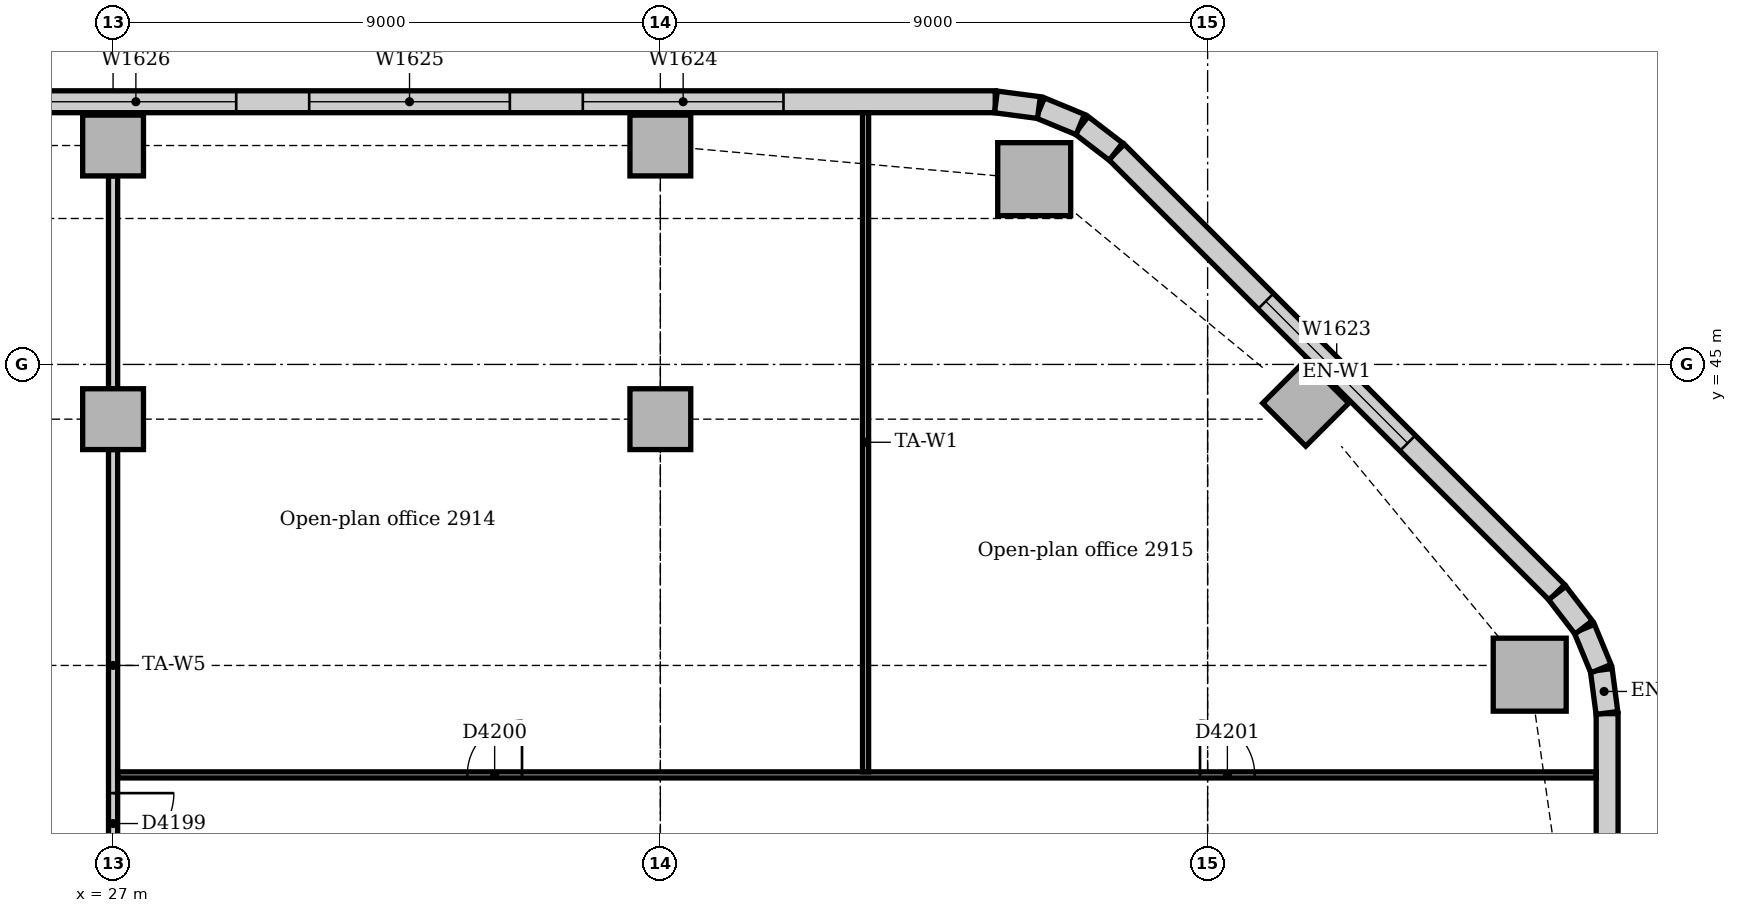
"""IFC4 building model, lengths in metres.
Left out: names, types, materials, properties, quantities, classifications, styles, units other than length and angle.
Written with IfcOpenShell. Run it as: python <this file> out.ifc"""

import sys

from ifc_helpers import new_model, si_unit, direction, frame, frame_2d, origin, origin_2d, place, context, subcontext, project, spatial, rectangle, extrude, element, fill, save


model = new_model("IFC4")
c1 = context("Model", 3, precision=1e-05, world=origin(), true_north=direction((0.0, 1.0)))
c2 = subcontext(c1, "Body", "Model", "MODEL_VIEW")
j1 = project(units=[si_unit("LENGTHUNIT", "METRE"), si_unit("PLANEANGLEUNIT", "RADIAN")], contexts=[c1])
p1 = place(None, origin())
s1 = spatial("IfcSite", under=j1, at=p1, CompositionType="ELEMENT")
p2 = place(p1, origin())
s2 = spatial("IfcBuilding", under=s1, at=p2, CompositionType="ELEMENT")
p3 = place(p2, frame((0.0, 0.0, 124.0)))
s3 = spatial("IfcBuildingStorey", under=s2, at=p3, CompositionType="ELEMENT", Elevation=124.0)
for number, where, z_axis, x_axis in (
    (1, (50.297, 39.898, 0.0), (0.0, 0.0, 1.0), (1.0, 0.0, 0.0)),
    (2, (42.148, 48.047, 0.0), (0.0, 0.0, 1.0), (1.0, 0.0, 0.0)),
):
    element("IfcColumn", number, at=place(p3, frame(where, z_axis=z_axis, x_axis=x_axis)), inside=s3, PredefinedType="COLUMN", context=c2, shape_type="SweptSolid", body=[
        extrude(rectangle(XDim=1.2, YDim=1.2, at=origin_2d()), origin(), (0.0, 0.0, 1.0), 3.85),
    ])
for number, where, z_axis, x_axis in (
    (3, (46.614, 44.364, 0.0), (0.0, 0.0, 1.0), (0.707, 0.707, 0.0)),
    (4, (27.0, 48.6, 0.0), (0.0, 0.0, 1.0), (1.0, 0.0, 0.0)),
    (5, (36.0, 48.6, 0.0), (0.0, 0.0, 1.0), (1.0, 0.0, 0.0)),
    (6, (27.0, 44.1, 0.0), (0.0, 0.0, 1.0), (1.0, 0.0, 0.0)),
    (7, (36.0, 44.1, 0.0), (0.0, 0.0, 1.0), (1.0, 0.0, 0.0)),
):
    element("IfcColumn", number, at=place(p3, frame(where, z_axis=z_axis, x_axis=x_axis)), inside=s3, PredefinedType="COLUMN", context=c2, shape_type="SweptSolid", body=[
        extrude(rectangle(XDim=1.0, YDim=1.0, at=origin_2d()), origin(), (0.0, 0.0, 1.0), 3.85),
    ])
p4 = place(p3, frame((51.57, 14.743, 0.0), z_axis=(0.0, 0.0, 1.0), x_axis=(0.0, 1.0, 0.0)))
e8 = element("IfcWall", 8, at=p4, inside=s3, PredefinedType="STANDARD", context=c2, shape_type="SweptSolid", body=[
    extrude(rectangle(XDim=24.515, YDim=0.36, at=frame_2d((12.257, 0.0))), origin(), (0.0, 0.0, 1.0), 3.85),
])
p5 = place(p4, frame((4.257, 0.0, 0.9)))
e9 = element("IfcOpeningElement", 9, at=p5, cuts=e8, PredefinedType="OPENING", context=c2, shape_type="SweptSolid", body=[
    extrude(rectangle(XDim=1.8, YDim=1.6, at=frame_2d((0.9, 0.8))), frame((0.0, 0.19, 0.0), z_axis=(0.0, -1.0, 0.0), x_axis=(1.0, 0.0, 0.0)), (0.0, 0.0, 1.0), 0.38),
])
p6 = place(p4, frame((8.357, 0.0, 0.9)))
e10 = element("IfcOpeningElement", 10, at=p6, cuts=e8, PredefinedType="OPENING", context=c2, shape_type="SweptSolid", body=[
    extrude(rectangle(XDim=3.3, YDim=1.6, at=frame_2d((1.65, 0.8))), frame((0.0, 0.19, 0.0), z_axis=(0.0, -1.0, 0.0), x_axis=(1.0, 0.0, 0.0)), (0.0, 0.0, 1.0), 0.38),
])
p7 = place(p4, frame((12.857, 0.0, 0.9)))
e11 = element("IfcOpeningElement", 11, at=p7, cuts=e8, PredefinedType="OPENING", context=c2, shape_type="SweptSolid", body=[
    extrude(rectangle(XDim=3.3, YDim=1.6, at=frame_2d((1.65, 0.8))), frame((0.0, 0.19, 0.0), z_axis=(0.0, -1.0, 0.0), x_axis=(1.0, 0.0, 0.0)), (0.0, 0.0, 1.0), 0.38),
])
p8 = place(p4, frame((17.357, 0.0, 0.9)))
e12 = element("IfcOpeningElement", 12, at=p8, cuts=e8, PredefinedType="OPENING", context=c2, shape_type="SweptSolid", body=[
    extrude(rectangle(XDim=3.3, YDim=1.6, at=frame_2d((1.65, 0.8))), frame((0.0, 0.19, 0.0), z_axis=(0.0, -1.0, 0.0), x_axis=(1.0, 0.0, 0.0)), (0.0, 0.0, 1.0), 0.38),
])
p9 = place(p3, frame((50.744, 41.251, 0.0), z_axis=(0.0, 0.0, 1.0), x_axis=(-0.707106781187, 0.707106781187, 0.0)))
e13 = element("IfcWall", 13, at=p9, inside=s3, PredefinedType="STANDARD", context=c2, shape_type="SweptSolid", body=[
    extrude(rectangle(XDim=10.243, YDim=0.36, at=frame_2d((5.121, 0.0))), origin(), (0.0, 0.0, 1.0), 3.85),
])
p10 = place(p9, frame((3.471, 0.0, 0.9)))
e14 = element("IfcOpeningElement", 14, at=p10, cuts=e13, PredefinedType="OPENING", context=c2, shape_type="SweptSolid", body=[
    extrude(rectangle(XDim=3.3, YDim=1.6, at=frame_2d((1.65, 0.8))), frame((0.0, 0.19, 0.0), z_axis=(0.0, -1.0, 0.0), x_axis=(1.0, 0.0, 0.0)), (0.0, 0.0, 1.0), 0.38),
])
p11 = place(p3, frame((41.507, 49.32, 0.0), z_axis=(0.0, 0.0, 1.0), x_axis=(-1.0, 0.0, 0.0)))
e15 = element("IfcWall", 15, at=p11, inside=s3, PredefinedType="STANDARD", context=c2, shape_type="SweptSolid", body=[
    extrude(rectangle(XDim=37.265, YDim=0.36, at=frame_2d((18.632, 0.0))), origin(), (0.0, 0.0, 1.0), 3.85),
])
p12 = place(p11, frame((3.482, 0.0, 0.9)))
e16 = element("IfcOpeningElement", 16, at=p12, cuts=e15, PredefinedType="OPENING", context=c2, shape_type="SweptSolid", body=[
    extrude(rectangle(XDim=3.3, YDim=1.6, at=frame_2d((1.65, 0.8))), frame((0.0, 0.19, 0.0), z_axis=(0.0, -1.0, 0.0), x_axis=(1.0, 0.0, 0.0)), (0.0, 0.0, 1.0), 0.38),
])
p13 = place(p11, frame((7.982, 0.0, 0.9)))
e17 = element("IfcOpeningElement", 17, at=p13, cuts=e15, PredefinedType="OPENING", context=c2, shape_type="SweptSolid", body=[
    extrude(rectangle(XDim=3.3, YDim=1.6, at=frame_2d((1.65, 0.8))), frame((0.0, 0.19, 0.0), z_axis=(0.0, -1.0, 0.0), x_axis=(1.0, 0.0, 0.0)), (0.0, 0.0, 1.0), 0.38),
])
p14 = place(p11, frame((12.482, 0.0, 0.9)))
e18 = element("IfcOpeningElement", 18, at=p14, cuts=e15, PredefinedType="OPENING", context=c2, shape_type="SweptSolid", body=[
    extrude(rectangle(XDim=3.3, YDim=1.6, at=frame_2d((1.65, 0.8))), frame((0.0, 0.19, 0.0), z_axis=(0.0, -1.0, 0.0), x_axis=(1.0, 0.0, 0.0)), (0.0, 0.0, 1.0), 0.38),
])
p15 = place(p11, frame((17.032, 0.0, 0.9)))
e19 = element("IfcOpeningElement", 19, at=p15, cuts=e15, PredefinedType="OPENING", context=c2, shape_type="SweptSolid", body=[
    extrude(rectangle(XDim=1.8, YDim=1.6, at=frame_2d((0.9, 0.8))), frame((0.0, 0.19, 0.0), z_axis=(0.0, -1.0, 0.0), x_axis=(1.0, 0.0, 0.0)), (0.0, 0.0, 1.0), 0.38),
])
p16 = place(p11, frame((21.482, 0.0, 0.9)))
e20 = element("IfcOpeningElement", 20, at=p16, cuts=e15, PredefinedType="OPENING", context=c2, shape_type="SweptSolid", body=[
    extrude(rectangle(XDim=3.3, YDim=1.6, at=frame_2d((1.65, 0.8))), frame((0.0, 0.19, 0.0), z_axis=(0.0, -1.0, 0.0), x_axis=(1.0, 0.0, 0.0)), (0.0, 0.0, 1.0), 0.38),
])
p17 = place(p11, frame((25.982, 0.0, 0.9)))
e21 = element("IfcOpeningElement", 21, at=p17, cuts=e15, PredefinedType="OPENING", context=c2, shape_type="SweptSolid", body=[
    extrude(rectangle(XDim=3.3, YDim=1.6, at=frame_2d((1.65, 0.8))), frame((0.0, 0.19, 0.0), z_axis=(0.0, -1.0, 0.0), x_axis=(1.0, 0.0, 0.0)), (0.0, 0.0, 1.0), 0.38),
])
p18 = place(p11, frame((30.482, 0.0, 0.9)))
e22 = element("IfcOpeningElement", 22, at=p18, cuts=e15, PredefinedType="OPENING", context=c2, shape_type="SweptSolid", body=[
    extrude(rectangle(XDim=3.3, YDim=1.6, at=frame_2d((1.65, 0.8))), frame((0.0, 0.19, 0.0), z_axis=(0.0, -1.0, 0.0), x_axis=(1.0, 0.0, 0.0)), (0.0, 0.0, 1.0), 0.38),
])
for number, where, z_axis, x_axis in (
    (23, (51.567, 39.269, 0.0), (0.0, 0.0, 1.0), (-0.131, 0.991, 0.0)),
    (24, (51.468, 39.997, 0.0), (0.0, 0.0, 1.0), (-0.383, 0.924, 0.0)),
):
    element("IfcWall", number, at=place(p3, frame(where, z_axis=z_axis, x_axis=x_axis)), inside=s3, PredefinedType="STANDARD", context=c2, shape_type="SweptSolid", body=[
        extrude(rectangle(XDim=0.713, YDim=0.36, at=frame_2d((0.356, 0.0))), origin(), (0.0, 0.0, 1.0), 3.85),
    ])
for number, where, z_axis, x_axis in (
    (25, (51.184, 40.675, 0.0), (0.0, 0.0, 1.0), (-0.609, 0.793, 0.0)),
    (26, (43.491, 48.5, 0.0), (0.0, 0.0, 1.0), (-0.793, 0.609, 0.0)),
):
    element("IfcWall", number, at=place(p3, frame(where, z_axis=z_axis, x_axis=x_axis)), inside=s3, PredefinedType="STANDARD", context=c2, shape_type="SweptSolid", body=[
        extrude(rectangle(XDim=0.713, YDim=0.36, at=frame_2d((0.357, 0.0))), origin(), (0.0, 0.0, 1.0), 3.85),
    ])
for number, where, z_axis, x_axis in (
    (27, (42.906, 48.945, 0.0), (0.0, 0.0, 1.0), (-0.924, 0.383, 0.0)),
    (28, (42.226, 49.224, 0.0), (0.0, 0.0, 1.0), (-0.991, 0.131, 0.0)),
):
    element("IfcWall", number, at=place(p3, frame(where, z_axis=z_axis, x_axis=x_axis)), inside=s3, PredefinedType="STANDARD", context=c2, shape_type="SweptSolid", body=[
        extrude(rectangle(XDim=0.713, YDim=0.36, at=frame_2d((0.356, 0.0))), origin(), (0.0, 0.0, 1.0), 3.85),
    ])
p19 = place(p3, frame((27.0, 36.5, 0.0), z_axis=(0.0, 0.0, 1.0), x_axis=(0.0, 1.0, 0.0)))
e29 = element("IfcWall", 29, at=p19, inside=s3, PredefinedType="PARTITIONING", context=c2, shape_type="SweptSolid", body=[
    extrude(rectangle(XDim=7.1, YDim=0.15, at=frame_2d((3.55, 0.0))), origin(), (0.0, 0.0, 1.0), 3.256),
])
p20 = place(p19, frame((0.45, 0.0, 0.0)))
e30 = element("IfcOpeningElement", 30, at=p20, cuts=e29, PredefinedType="OPENING", context=c2, shape_type="SweptSolid", body=[
    extrude(rectangle(XDim=1.0, YDim=2.1, at=frame_2d((0.5, 1.05))), frame((0.0, 0.085, 0.0), z_axis=(0.0, -1.0, 0.0), x_axis=(1.0, 0.0, 0.0)), (0.0, 0.0, 1.0), 0.17),
])
p21 = place(p3, frame((27.0, 44.6, 0.0), z_axis=(0.0, 0.0, 1.0), x_axis=(0.0, 1.0, 0.0)))
e31 = element("IfcWall", 31, at=p21, inside=s3, PredefinedType="PARTITIONING", context=c2, shape_type="SweptSolid", body=[
    extrude(rectangle(XDim=3.5, YDim=0.15, at=frame_2d((1.75, 0.0))), origin(), (0.0, 0.0, 1.0), 3.652),
])
p22 = place(p3, frame((27.075, 38.25, 0.0), z_axis=(0.0, 0.0, 1.0), x_axis=(1.0, 0.0, 0.0)))
e32 = element("IfcWall", 32, at=p22, inside=s3, PredefinedType="PARTITIONING", context=c2, shape_type="SweptSolid", body=[
    extrude(rectangle(XDim=24.315, YDim=0.1, at=frame_2d((12.158, 0.0))), origin(), (0.0, 0.0, 1.0), 3.85),
])
p23 = place(p22, frame((5.75, 0.0, 0.0)))
e33 = element("IfcOpeningElement", 33, at=p23, cuts=e32, PredefinedType="OPENING", context=c2, shape_type="SweptSolid", body=[
    extrude(rectangle(XDim=0.9, YDim=2.1, at=frame_2d((0.45, 1.05))), frame((0.0, 0.06, 0.0), z_axis=(0.0, -1.0, 0.0), x_axis=(1.0, 0.0, 0.0)), (0.0, 0.0, 1.0), 0.12),
])
p24 = place(p22, frame((17.8, 0.0, 0.0)))
e34 = element("IfcOpeningElement", 34, at=p24, cuts=e32, PredefinedType="OPENING", context=c2, shape_type="SweptSolid", body=[
    extrude(rectangle(XDim=0.9, YDim=2.1, at=frame_2d((0.45, 1.05))), frame((0.0, 0.06, 0.0), z_axis=(0.0, -1.0, 0.0), x_axis=(1.0, 0.0, 0.0)), (0.0, 0.0, 1.0), 0.12),
])
p25 = place(p3, frame((39.375, 38.3, 0.0), z_axis=(0.0, 0.0, 1.0), x_axis=(0.0, 1.0, 0.0)))
e35 = element("IfcWall", 35, at=p25, inside=s3, PredefinedType="PARTITIONING", context=c2, shape_type="SweptSolid", body=[
    extrude(rectangle(XDim=10.84, YDim=0.1, at=frame_2d((5.42, 0.0))), origin(), (0.0, 0.0, 1.0), 3.85),
])
p26 = place(p10, origin())
e36 = element("IfcWindow", 36, at=p26, inside=s3, PartitioningType="SINGLE_PANEL", PredefinedType="WINDOW", context=c2, shape_type="SweptSolid", body=[
    extrude(rectangle(XDim=3.3, YDim=1.6, at=frame_2d((1.65, 0.8))), frame((0.0, 0.13, 0.0), z_axis=(0.0, -1.0, 0.0), x_axis=(1.0, 0.0, 0.0)), (0.0, 0.0, 1.0), 0.06),
])
fill(e14, e36)
p27 = place(p12, origin())
e37 = element("IfcWindow", 37, at=p27, inside=s3, PartitioningType="SINGLE_PANEL", PredefinedType="WINDOW", context=c2, shape_type="SweptSolid", body=[
    extrude(rectangle(XDim=3.3, YDim=1.6, at=frame_2d((1.65, 0.8))), frame((0.0, 0.13, 0.0), z_axis=(0.0, -1.0, 0.0), x_axis=(1.0, 0.0, 0.0)), (0.0, 0.0, 1.0), 0.06),
])
fill(e16, e37)
p28 = place(p13, origin())
e38 = element("IfcWindow", 38, at=p28, inside=s3, PartitioningType="SINGLE_PANEL", PredefinedType="WINDOW", context=c2, shape_type="SweptSolid", body=[
    extrude(rectangle(XDim=3.3, YDim=1.6, at=frame_2d((1.65, 0.8))), frame((0.0, 0.13, 0.0), z_axis=(0.0, -1.0, 0.0), x_axis=(1.0, 0.0, 0.0)), (0.0, 0.0, 1.0), 0.06),
])
fill(e17, e38)
p29 = place(p14, origin())
e39 = element("IfcWindow", 39, at=p29, inside=s3, PartitioningType="SINGLE_PANEL", PredefinedType="WINDOW", context=c2, shape_type="SweptSolid", body=[
    extrude(rectangle(XDim=3.3, YDim=1.6, at=frame_2d((1.65, 0.8))), frame((0.0, 0.13, 0.0), z_axis=(0.0, -1.0, 0.0), x_axis=(1.0, 0.0, 0.0)), (0.0, 0.0, 1.0), 0.06),
])
fill(e18, e39)
p30 = place(p20, frame((1.0, 0.0, 0.0), z_axis=(0.0, 0.0, 1.0), x_axis=(-1.0, 0.0, 0.0)))
e40 = element("IfcDoor", 40, at=p30, inside=s3, OperationType="SINGLE_SWING_LEFT", PredefinedType="DOOR", context=c2, shape_type="SweptSolid", body=[
    extrude(rectangle(XDim=1.0, YDim=2.1, at=frame_2d((0.5, 1.05))), frame((0.0, 0.025, 0.0), z_axis=(0.0, -1.0, 0.0), x_axis=(1.0, 0.0, 0.0)), (0.0, 0.0, 1.0), 0.05),
])
fill(e30, e40)
p31 = place(p23, origin())
e41 = element("IfcDoor", 41, at=p31, inside=s3, OperationType="SINGLE_SWING_RIGHT", PredefinedType="DOOR", context=c2, shape_type="SweptSolid", body=[
    extrude(rectangle(XDim=0.9, YDim=2.1, at=frame_2d((0.45, 1.05))), frame((0.0, 0.025, 0.0), z_axis=(0.0, -1.0, 0.0), x_axis=(1.0, 0.0, 0.0)), (0.0, 0.0, 1.0), 0.05),
])
fill(e33, e41)
p32 = place(p24, origin())
e42 = element("IfcDoor", 42, at=p32, inside=s3, OperationType="SINGLE_SWING_LEFT", PredefinedType="DOOR", context=c2, shape_type="SweptSolid", body=[
    extrude(rectangle(XDim=0.9, YDim=2.1, at=frame_2d((0.45, 1.05))), frame((0.0, 0.025, 0.0), z_axis=(0.0, -1.0, 0.0), x_axis=(1.0, 0.0, 0.0)), (0.0, 0.0, 1.0), 0.05),
])
fill(e34, e42)
save(model, sys.argv[1])
